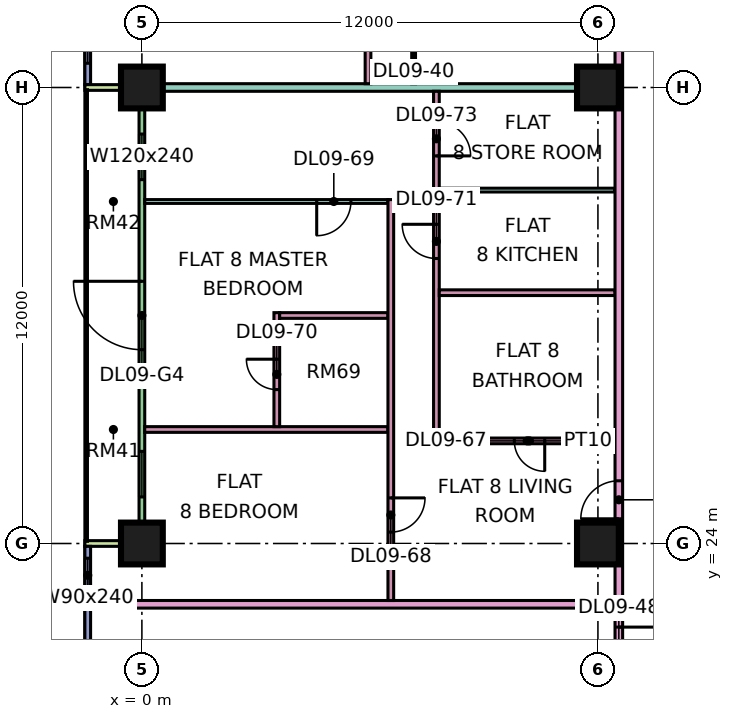
"""IFC4 building model, lengths in metres.
Left out: names, types, materials, properties, quantities, classifications, styles, units other than length and angle.
Written with IfcOpenShell. Run it as: python <this file> out.ifc"""

import sys

from ifc_helpers import new_model, si_unit, direction, frame, frame_2d, origin, origin_2d, place, context, subcontext, project, spatial, rectangle, extrude, element, fill, save


model = new_model("IFC4")
c1 = context("Model", 3, precision=1e-05, world=origin(), true_north=direction((0.0, 1.0)))
c2 = subcontext(c1, "Body", "Model", "MODEL_VIEW")
j1 = project(units=[si_unit("LENGTHUNIT", "METRE"), si_unit("PLANEANGLEUNIT", "RADIAN")], contexts=[c1])
p1 = place(None, origin())
s1 = spatial("IfcSite", under=j1, at=p1, CompositionType="ELEMENT")
p2 = place(p1, origin())
s2 = spatial("IfcBuilding", under=s1, at=p2, CompositionType="ELEMENT")
p3 = place(p2, frame((0.0, 0.0, 48.9)))
s3 = spatial("IfcBuildingStorey", under=s2, at=p3, CompositionType="ELEMENT", Elevation=48.9)
p4 = place(p3, frame((0.0, 24.0, 0.0), z_axis=(0.0, 0.0, 1.0), x_axis=(1.0, 0.0, 0.0)))
e1 = element("IfcColumn", 1, at=p4, inside=s3, PredefinedType="COLUMN", context=c2, shape_type="SweptSolid", body=[
    extrude(rectangle(XDim=1.1, YDim=1.1, at=origin_2d()), origin(), (0.0, 0.0, 1.0), 3.75),
])
p5 = place(p3, frame((0.0, 36.0, 0.0), z_axis=(0.0, 0.0, 1.0), x_axis=(1.0, 0.0, 0.0)))
e2 = element("IfcColumn", 2, at=p5, inside=s3, PredefinedType="COLUMN", context=c2, shape_type="SweptSolid", body=[
    extrude(rectangle(XDim=1.1, YDim=1.1, at=origin_2d()), origin(), (0.0, 0.0, 1.0), 3.75),
])
for number, where, z_axis, x_axis in (
    (3, (12.0, 24.0, 0.0), (0.0, 0.0, 1.0), (1.0, 0.0, 0.0)),
    (4, (12.0, 36.0, 0.0), (0.0, 0.0, 1.0), (1.0, 0.0, 0.0)),
):
    element("IfcColumn", number, at=place(p3, frame(where, z_axis=z_axis, x_axis=x_axis)), inside=s3, PredefinedType="COLUMN", context=c2, shape_type="SweptSolid", body=[
        extrude(rectangle(XDim=1.1, YDim=1.1, at=origin_2d()), origin(), (0.0, 0.0, 1.0), 3.75),
    ])
p6 = place(p3, frame((-1.425, 47.925, 0.0), z_axis=(0.0, 0.0, 1.0), x_axis=(0.0, -1.0, 0.0)))
e5 = element("IfcWall", 5, at=p6, inside=s3, PredefinedType="SOLIDWALL", context=c2, shape_type="SweptSolid", body=[
    extrude(rectangle(XDim=11.85, YDim=0.15, at=frame_2d((5.925, 0.0))), origin(), (0.0, 0.0, 1.0), 3.35),
])
p7 = place(p6, frame((0.562, 0.0, 0.45)))
e6 = element("IfcOpeningElement", 6, at=p7, cuts=e5, PredefinedType="OPENING", context=c2, shape_type="SweptSolid", body=[
    extrude(rectangle(XDim=1.8, YDim=2.4, at=frame_2d((0.9, 1.2))), frame((0.0, 0.085, 0.0), z_axis=(0.0, -1.0, 0.0), x_axis=(1.0, 0.0, 0.0)), (0.0, 0.0, 1.0), 0.17),
])
p8 = place(p6, frame((4.425, 0.0, 0.45)))
e7 = element("IfcOpeningElement", 7, at=p8, cuts=e5, PredefinedType="OPENING", context=c2, shape_type="SweptSolid", body=[
    extrude(rectangle(XDim=3.0, YDim=2.4, at=frame_2d((1.5, 1.2))), frame((0.0, 0.085, 0.0), z_axis=(0.0, -1.0, 0.0), x_axis=(1.0, 0.0, 0.0)), (0.0, 0.0, 1.0), 0.17),
])
p9 = place(p6, frame((9.488, 0.0, 0.45)))
e8 = element("IfcOpeningElement", 8, at=p9, cuts=e5, PredefinedType="OPENING", context=c2, shape_type="SweptSolid", body=[
    extrude(rectangle(XDim=1.8, YDim=2.4, at=frame_2d((0.9, 1.2))), frame((0.0, 0.085, 0.0), z_axis=(0.0, -1.0, 0.0), x_axis=(1.0, 0.0, 0.0)), (0.0, 0.0, 1.0), 0.17),
])
p10 = place(p3, frame((0.0, 35.925, 0.0), z_axis=(0.0, 0.0, 1.0), x_axis=(0.0, -1.0, 0.0)))
e9 = element("IfcWall", 9, at=p10, inside=s3, PredefinedType="SOLIDWALL", context=c2, shape_type="SweptSolid", body=[
    extrude(rectangle(XDim=11.85, YDim=0.15, at=frame_2d((5.925, 0.0))), origin(), (0.0, 0.0, 1.0), 3.35),
])
p11 = place(p10, frame((1.15, 0.0, 0.45)))
e10 = element("IfcOpeningElement", 10, at=p11, cuts=e9, PredefinedType="OPENING", context=c2, shape_type="SweptSolid", body=[
    extrude(rectangle(XDim=1.2, YDim=2.4, at=frame_2d((0.6, 1.2))), frame((0.0, 0.085, 0.0), z_axis=(0.0, -1.0, 0.0), x_axis=(1.0, 0.0, 0.0)), (0.0, 0.0, 1.0), 0.17),
])
p12 = place(p10, frame((5.025, 0.0, 0.0)))
e11 = element("IfcOpeningElement", 11, at=p12, cuts=e9, PredefinedType="OPENING", context=c2, shape_type="SweptSolid", body=[
    extrude(rectangle(XDim=1.8, YDim=2.4, at=frame_2d((0.9, 1.2))), frame((0.0, 0.085, 0.0), z_axis=(0.0, -1.0, 0.0), x_axis=(1.0, 0.0, 0.0)), (0.0, 0.0, 1.0), 0.17),
])
p13 = place(p10, frame((9.5, 0.0, 0.45)))
e12 = element("IfcOpeningElement", 12, at=p13, cuts=e9, PredefinedType="OPENING", context=c2, shape_type="SweptSolid", body=[
    extrude(rectangle(XDim=1.2, YDim=2.4, at=frame_2d((0.6, 1.2))), frame((0.0, 0.085, 0.0), z_axis=(0.0, -1.0, 0.0), x_axis=(1.0, 0.0, 0.0)), (0.0, 0.0, 1.0), 0.17),
])
for number, where, z_axis, x_axis in (
    (13, (-1.5, 36.0, 0.0), (0.0, 0.0, 1.0), (1.0, 0.0, 0.0)),
    (14, (-1.5, 24.0, 0.0), (0.0, 0.0, 1.0), (1.0, 0.0, 0.0)),
):
    element("IfcWall", number, at=place(p3, frame(where, z_axis=z_axis, x_axis=x_axis)), inside=s3, PredefinedType="SOLIDWALL", context=c2, shape_type="SweptSolid", body=[
        extrude(rectangle(XDim=1.5, YDim=0.15, at=frame_2d((0.75, 0.0))), origin(), (0.0, 0.0, 1.0), 3.35),
    ])
p14 = place(p3, frame((-1.425, 23.925, 0.0), z_axis=(0.0, 0.0, 1.0), x_axis=(0.0, -1.0, 0.0)))
e15 = element("IfcWall", 15, at=p14, inside=s3, PredefinedType="SOLIDWALL", context=c2, shape_type="SweptSolid", body=[
    extrude(rectangle(XDim=11.425, YDim=0.15, at=frame_2d((5.712, 0.0))), origin(), (0.0, 0.0, 1.0), 3.35),
])
p15 = place(p14, frame((0.312, 0.0, 0.45)))
e16 = element("IfcOpeningElement", 16, at=p15, cuts=e15, PredefinedType="OPENING", context=c2, shape_type="SweptSolid", body=[
    extrude(rectangle(XDim=0.9, YDim=2.4, at=frame_2d((0.45, 1.2))), frame((0.0, 0.085, 0.0), z_axis=(0.0, -1.0, 0.0), x_axis=(1.0, 0.0, 0.0)), (0.0, 0.0, 1.0), 0.17),
])
p16 = place(p14, frame((6.175, 0.0, 0.45)))
e17 = element("IfcOpeningElement", 17, at=p16, cuts=e15, PredefinedType="OPENING", context=c2, shape_type="SweptSolid", body=[
    extrude(rectangle(XDim=3.0, YDim=2.4, at=frame_2d((1.5, 1.2))), frame((0.0, 0.085, 0.0), z_axis=(0.0, -1.0, 0.0), x_axis=(1.0, 0.0, 0.0)), (0.0, 0.0, 1.0), 0.17),
])
p17 = place(p3, frame((-1.35, 22.4, 0.0), z_axis=(0.0, 0.0, 1.0), x_axis=(1.0, 0.0, 0.0)))
e18 = element("IfcWall", 18, at=p17, inside=s3, PredefinedType="PARTITIONING", context=c2, shape_type="SweptSolid", body=[
    extrude(rectangle(XDim=13.8, YDim=0.2, at=frame_2d((6.9, 0.0))), origin(), (0.0, 0.0, 1.0), 3.35),
])
e19 = element("IfcWall", 19, at=p5, inside=s3, PredefinedType="PARTITIONING", context=c2, shape_type="SweptSolid", body=[
    extrude(rectangle(XDim=12.45, YDim=0.2, at=frame_2d((6.225, 0.0))), origin(), (0.0, 0.0, 1.0), 3.35),
])
p18 = place(p3, frame((0.074, 27.0, 0.0), z_axis=(0.0, 0.0, 1.0), x_axis=(1.0, 0.0, 0.0)))
e20 = element("IfcWall", 20, at=p18, inside=s3, PredefinedType="PARTITIONING", context=c2, shape_type="SweptSolid", body=[
    extrude(rectangle(XDim=6.401, YDim=0.15, at=frame_2d((3.201, 0.0))), origin(), (0.0, 0.0, 1.0), 3.35),
])
p19 = place(p3, frame((0.074, 33.0, 0.0), z_axis=(0.0, 0.0, 1.0), x_axis=(1.0, 0.0, 0.0)))
e21 = element("IfcWall", 21, at=p19, inside=s3, PredefinedType="PARTITIONING", context=c2, shape_type="SweptSolid", body=[
    extrude(rectangle(XDim=6.401, YDim=0.1, at=frame_2d((3.201, 0.0))), origin(), (0.0, 0.0, 1.0), 3.35),
])
p20 = place(p19, frame((4.526, 0.0, 0.0)))
e22 = element("IfcOpeningElement", 22, at=p20, cuts=e21, PredefinedType="OPENING", context=c2, shape_type="SweptSolid", body=[
    extrude(rectangle(XDim=0.9, YDim=2.1, at=frame_2d((0.45, 1.05))), frame((0.0, 0.06, 0.0), z_axis=(0.0, -1.0, 0.0), x_axis=(1.0, 0.0, 0.0)), (0.0, 0.0, 1.0), 0.12),
])
p21 = place(p3, frame((3.55, 27.075, 0.0), z_axis=(0.0, 0.0, 1.0), x_axis=(0.0, 1.0, 0.0)))
e23 = element("IfcWall", 23, at=p21, inside=s3, PredefinedType="PARTITIONING", context=c2, shape_type="SweptSolid", body=[
    extrude(rectangle(XDim=3.0, YDim=0.15, at=frame_2d((1.5, 0.0))), origin(), (0.0, 0.0, 1.0), 3.35),
])
p22 = place(p21, frame((0.975, 0.0, 0.0)))
e24 = element("IfcOpeningElement", 24, at=p22, cuts=e23, PredefinedType="OPENING", context=c2, shape_type="SweptSolid", body=[
    extrude(rectangle(XDim=0.8, YDim=2.1, at=frame_2d((0.4, 1.05))), frame((0.0, 0.085, 0.0), z_axis=(0.0, -1.0, 0.0), x_axis=(1.0, 0.0, 0.0)), (0.0, 0.0, 1.0), 0.17),
])
p23 = place(p3, frame((3.625, 30.0, 0.0), z_axis=(0.0, 0.0, 1.0), x_axis=(1.0, 0.0, 0.0)))
e25 = element("IfcWall", 25, at=p23, inside=s3, PredefinedType="PARTITIONING", context=c2, shape_type="SweptSolid", body=[
    extrude(rectangle(XDim=2.85, YDim=0.15, at=frame_2d((1.425, 0.0))), origin(), (0.0, 0.0, 1.0), 3.35),
])
p24 = place(p3, frame((5.95, 36.1, 0.0), z_axis=(0.0, 0.0, 1.0), x_axis=(0.0, 1.0, 0.0)))
e26 = element("IfcWall", 26, at=p24, inside=s3, PredefinedType="PARTITIONING", context=c2, shape_type="SweptSolid", body=[
    extrude(rectangle(XDim=8.95, YDim=0.15, at=frame_2d((4.475, 0.0))), origin(), (0.0, 0.0, 1.0), 3.35),
])
p25 = place(p24, frame((0.95, 0.0, 0.0)))
e27 = element("IfcOpeningElement", 27, at=p25, cuts=e26, PredefinedType="OPENING", context=c2, shape_type="SweptSolid", body=[
    extrude(rectangle(XDim=0.9, YDim=2.1, at=frame_2d((0.45, 1.05))), frame((0.0, 0.085, 0.0), z_axis=(0.0, -1.0, 0.0), x_axis=(1.0, 0.0, 0.0)), (0.0, 0.0, 1.0), 0.17),
])
p26 = place(p24, frame((6.95, 0.0, 0.0)))
e28 = element("IfcOpeningElement", 28, at=p26, cuts=e26, PredefinedType="OPENING", context=c2, shape_type="SweptSolid", body=[
    extrude(rectangle(XDim=0.9, YDim=2.1, at=frame_2d((0.45, 1.05))), frame((0.0, 0.085, 0.0), z_axis=(0.0, -1.0, 0.0), x_axis=(1.0, 0.0, 0.0)), (0.0, 0.0, 1.0), 0.17),
])
p27 = place(p3, frame((6.55, 22.5, 0.0), z_axis=(0.0, 0.0, 1.0), x_axis=(0.0, 1.0, 0.0)))
e29 = element("IfcWall", 29, at=p27, inside=s3, PredefinedType="PARTITIONING", context=c2, shape_type="SweptSolid", body=[
    extrude(rectangle(XDim=10.55, YDim=0.15, at=frame_2d((5.275, 0.0))), origin(), (0.0, 0.0, 1.0), 3.35),
])
p28 = place(p27, frame((1.8, 0.0, 0.0)))
e30 = element("IfcOpeningElement", 30, at=p28, cuts=e29, PredefinedType="OPENING", context=c2, shape_type="SweptSolid", body=[
    extrude(rectangle(XDim=0.9, YDim=2.1, at=frame_2d((0.45, 1.05))), frame((0.0, 0.085, 0.0), z_axis=(0.0, -1.0, 0.0), x_axis=(1.0, 0.0, 0.0)), (0.0, 0.0, 1.0), 0.17),
])
p29 = place(p3, frame((7.15, 36.1, 0.0), z_axis=(0.0, 0.0, 1.0), x_axis=(0.0, 1.0, 0.0)))
e31 = element("IfcWall", 31, at=p29, inside=s3, PredefinedType="PARTITIONING", context=c2, shape_type="SweptSolid", body=[
    extrude(rectangle(XDim=2.9, YDim=0.1, at=frame_2d((1.45, 0.0))), origin(), (0.0, 0.0, 1.0), 3.35),
])
p30 = place(p29, frame((0.95, 0.0, 0.0)))
e32 = element("IfcOpeningElement", 32, at=p30, cuts=e31, PredefinedType="OPENING", context=c2, shape_type="SweptSolid", body=[
    extrude(rectangle(XDim=0.9, YDim=2.1, at=frame_2d((0.45, 1.05))), frame((0.0, 0.06, 0.0), z_axis=(0.0, -1.0, 0.0), x_axis=(1.0, 0.0, 0.0)), (0.0, 0.0, 1.0), 0.12),
])
p31 = place(p3, frame((7.75, 26.625, 0.0), z_axis=(0.0, 0.0, 1.0), x_axis=(0.0, 1.0, 0.0)))
e33 = element("IfcWall", 33, at=p31, inside=s3, PredefinedType="PARTITIONING", context=c2, shape_type="SweptSolid", body=[
    extrude(rectangle(XDim=9.275, YDim=0.15, at=frame_2d((4.637, 0.0))), origin(), (0.0, 0.0, 1.0), 3.35),
])
p32 = place(p31, frame((4.875, 0.0, 0.0)))
e34 = element("IfcOpeningElement", 34, at=p32, cuts=e33, PredefinedType="OPENING", context=c2, shape_type="SweptSolid", body=[
    extrude(rectangle(XDim=0.9, YDim=2.1, at=frame_2d((0.45, 1.05))), frame((0.0, 0.085, 0.0), z_axis=(0.0, -1.0, 0.0), x_axis=(1.0, 0.0, 0.0)), (0.0, 0.0, 1.0), 0.17),
])
p33 = place(p31, frame((7.575, 0.0, 0.0)))
e35 = element("IfcOpeningElement", 35, at=p33, cuts=e33, PredefinedType="OPENING", context=c2, shape_type="SweptSolid", body=[
    extrude(rectangle(XDim=0.9, YDim=2.1, at=frame_2d((0.45, 1.05))), frame((0.0, 0.085, 0.0), z_axis=(0.0, -1.0, 0.0), x_axis=(1.0, 0.0, 0.0)), (0.0, 0.0, 1.0), 0.17),
])
p34 = place(p3, frame((7.825, 26.7, 0.0), z_axis=(0.0, 0.0, 1.0), x_axis=(1.0, 0.0, 0.0)))
e36 = element("IfcWall", 36, at=p34, inside=s3, PredefinedType="PARTITIONING", context=c2, shape_type="SweptSolid", body=[
    extrude(rectangle(XDim=4.625, YDim=0.15, at=frame_2d((2.312, 0.0))), origin(), (0.0, 0.0, 1.0), 3.35),
])
p35 = place(p34, frame((1.975, 0.0, 0.0)))
e37 = element("IfcOpeningElement", 37, at=p35, cuts=e36, PredefinedType="OPENING", context=c2, shape_type="SweptSolid", body=[
    extrude(rectangle(XDim=0.8, YDim=2.1, at=frame_2d((0.4, 1.05))), frame((0.0, 0.085, 0.0), z_axis=(0.0, -1.0, 0.0), x_axis=(1.0, 0.0, 0.0)), (0.0, 0.0, 1.0), 0.17),
])
p36 = place(p3, frame((7.825, 30.6, 0.0), z_axis=(0.0, 0.0, 1.0), x_axis=(1.0, 0.0, 0.0)))
e38 = element("IfcWall", 38, at=p36, inside=s3, PredefinedType="PARTITIONING", context=c2, shape_type="SweptSolid", body=[
    extrude(rectangle(XDim=4.625, YDim=0.15, at=frame_2d((2.312, 0.0))), origin(), (0.0, 0.0, 1.0), 3.35),
])
p37 = place(p3, frame((7.825, 33.3, 0.0), z_axis=(0.0, 0.0, 1.0), x_axis=(1.0, 0.0, 0.0)))
e39 = element("IfcWall", 39, at=p37, inside=s3, PredefinedType="PARTITIONING", context=c2, shape_type="SweptSolid", body=[
    extrude(rectangle(XDim=4.625, YDim=0.1, at=frame_2d((2.312, 0.0))), origin(), (0.0, 0.0, 1.0), 3.35),
])
p38 = place(p3, frame((12.55, 20.0, 0.0), z_axis=(0.0, 0.0, 1.0), x_axis=(0.0, 1.0, 0.0)))
e40 = element("IfcWall", 40, at=p38, inside=s3, PredefinedType="PARTITIONING", context=c2, shape_type="SweptSolid", body=[
    extrude(rectangle(XDim=19.0, YDim=0.2, at=frame_2d((9.5, 0.0))), origin(), (0.0, 0.0, 1.0), 3.35),
])
p39 = place(p38, frame((0.6, 0.0, 0.0)))
e41 = element("IfcOpeningElement", 41, at=p39, cuts=e40, PredefinedType="OPENING", context=c2, shape_type="SweptSolid", body=[
    extrude(rectangle(XDim=1.2, YDim=2.1, at=frame_2d((0.6, 1.05))), frame((0.0, 0.11, 0.0), z_axis=(0.0, -1.0, 0.0), x_axis=(1.0, 0.0, 0.0)), (0.0, 0.0, 1.0), 0.22),
])
p40 = place(p38, frame((4.65, 0.0, 0.0)))
e42 = element("IfcOpeningElement", 42, at=p40, cuts=e40, PredefinedType="OPENING", context=c2, shape_type="SweptSolid", body=[
    extrude(rectangle(XDim=1.0, YDim=2.1, at=frame_2d((0.5, 1.05))), frame((0.0, 0.11, 0.0), z_axis=(0.0, -1.0, 0.0), x_axis=(1.0, 0.0, 0.0)), (0.0, 0.0, 1.0), 0.22),
])
p41 = place(p9, origin())
e43 = element("IfcWindow", 43, at=p41, inside=s3, PartitioningType="SINGLE_PANEL", PredefinedType="WINDOW", context=c2, shape_type="SweptSolid", body=[
    extrude(rectangle(XDim=1.8, YDim=2.4, at=frame_2d((0.9, 1.2))), frame((0.0, 0.03, 0.0), z_axis=(0.0, -1.0, 0.0), x_axis=(1.0, 0.0, 0.0)), (0.0, 0.0, 1.0), 0.06),
])
fill(e8, e43)
p42 = place(p11, origin())
e44 = element("IfcWindow", 44, at=p42, inside=s3, PartitioningType="SINGLE_PANEL", PredefinedType="WINDOW", context=c2, shape_type="SweptSolid", body=[
    extrude(rectangle(XDim=1.2, YDim=2.4, at=frame_2d((0.6, 1.2))), frame((0.0, 0.03, 0.0), z_axis=(0.0, -1.0, 0.0), x_axis=(1.0, 0.0, 0.0)), (0.0, 0.0, 1.0), 0.06),
])
fill(e10, e44)
p43 = place(p12, frame((1.8, 0.0, 0.0), z_axis=(0.0, 0.0, 1.0), x_axis=(-1.0, 0.0, 0.0)))
e45 = element("IfcDoor", 45, at=p43, inside=s3, OperationType="DOUBLE_DOOR_SINGLE_SWING", PredefinedType="DOOR", context=c2, shape_type="SweptSolid", body=[
    extrude(rectangle(XDim=1.8, YDim=2.4, at=frame_2d((0.9, 1.2))), frame((0.0, 0.025, 0.0), z_axis=(0.0, -1.0, 0.0), x_axis=(1.0, 0.0, 0.0)), (0.0, 0.0, 1.0), 0.05),
])
fill(e11, e45)
p44 = place(p13, origin())
e46 = element("IfcWindow", 46, at=p44, inside=s3, PartitioningType="SINGLE_PANEL", PredefinedType="WINDOW", context=c2, shape_type="SweptSolid", body=[
    extrude(rectangle(XDim=1.2, YDim=2.4, at=frame_2d((0.6, 1.2))), frame((0.0, 0.03, 0.0), z_axis=(0.0, -1.0, 0.0), x_axis=(1.0, 0.0, 0.0)), (0.0, 0.0, 1.0), 0.06),
])
fill(e12, e46)
p45 = place(p15, origin())
e47 = element("IfcWindow", 47, at=p45, inside=s3, PartitioningType="SINGLE_PANEL", PredefinedType="WINDOW", context=c2, shape_type="SweptSolid", body=[
    extrude(rectangle(XDim=0.9, YDim=2.4, at=frame_2d((0.45, 1.2))), frame((0.0, 0.03, 0.0), z_axis=(0.0, -1.0, 0.0), x_axis=(1.0, 0.0, 0.0)), (0.0, 0.0, 1.0), 0.06),
])
fill(e16, e47)
p46 = place(p39, origin())
e48 = element("IfcDoor", 48, at=p46, inside=s3, OperationType="SINGLE_SWING_RIGHT", PredefinedType="DOOR", context=c2, shape_type="SweptSolid", body=[
    extrude(rectangle(XDim=1.2, YDim=2.1, at=frame_2d((0.6, 1.05))), frame((0.0, 0.025, 0.0), z_axis=(0.0, -1.0, 0.0), x_axis=(1.0, 0.0, 0.0)), (0.0, 0.0, 1.0), 0.05),
])
fill(e41, e48)
p47 = place(p35, origin())
e49 = element("IfcDoor", 49, at=p47, inside=s3, OperationType="SINGLE_SWING_RIGHT", PredefinedType="DOOR", context=c2, shape_type="SweptSolid", body=[
    extrude(rectangle(XDim=0.8, YDim=2.1, at=frame_2d((0.4, 1.05))), frame((0.0, 0.025, 0.0), z_axis=(0.0, -1.0, 0.0), x_axis=(1.0, 0.0, 0.0)), (0.0, 0.0, 1.0), 0.05),
])
fill(e37, e49)
p48 = place(p28, origin())
e50 = element("IfcDoor", 50, at=p48, inside=s3, OperationType="SINGLE_SWING_RIGHT", PredefinedType="DOOR", context=c2, shape_type="SweptSolid", body=[
    extrude(rectangle(XDim=0.9, YDim=2.1, at=frame_2d((0.45, 1.05))), frame((0.0, 0.025, 0.0), z_axis=(0.0, -1.0, 0.0), x_axis=(1.0, 0.0, 0.0)), (0.0, 0.0, 1.0), 0.05),
])
fill(e30, e50)
p49 = place(p20, frame((0.9, 0.0, 0.0), z_axis=(0.0, 0.0, 1.0), x_axis=(-1.0, 0.0, 0.0)))
e51 = element("IfcDoor", 51, at=p49, inside=s3, OperationType="SINGLE_SWING_LEFT", PredefinedType="DOOR", context=c2, shape_type="SweptSolid", body=[
    extrude(rectangle(XDim=0.9, YDim=2.1, at=frame_2d((0.45, 1.05))), frame((0.0, 0.025, 0.0), z_axis=(0.0, -1.0, 0.0), x_axis=(1.0, 0.0, 0.0)), (0.0, 0.0, 1.0), 0.05),
])
fill(e22, e51)
p50 = place(p22, frame((0.8, 0.0, 0.0), z_axis=(0.0, 0.0, 1.0), x_axis=(-1.0, 0.0, 0.0)))
e52 = element("IfcDoor", 52, at=p50, inside=s3, OperationType="SINGLE_SWING_RIGHT", PredefinedType="DOOR", context=c2, shape_type="SweptSolid", body=[
    extrude(rectangle(XDim=0.8, YDim=2.1, at=frame_2d((0.4, 1.05))), frame((0.0, 0.025, 0.0), z_axis=(0.0, -1.0, 0.0), x_axis=(1.0, 0.0, 0.0)), (0.0, 0.0, 1.0), 0.05),
])
fill(e24, e52)
p51 = place(p32, frame((0.9, 0.0, 0.0), z_axis=(0.0, 0.0, 1.0), x_axis=(-1.0, 0.0, 0.0)))
e53 = element("IfcDoor", 53, at=p51, inside=s3, OperationType="SINGLE_SWING_RIGHT", PredefinedType="DOOR", context=c2, shape_type="SweptSolid", body=[
    extrude(rectangle(XDim=0.9, YDim=2.1, at=frame_2d((0.45, 1.05))), frame((0.0, 0.025, 0.0), z_axis=(0.0, -1.0, 0.0), x_axis=(1.0, 0.0, 0.0)), (0.0, 0.0, 1.0), 0.05),
])
fill(e34, e53)
p52 = place(p40, origin())
e54 = element("IfcDoor", 54, at=p52, inside=s3, OperationType="SINGLE_SWING_LEFT", PredefinedType="DOOR", context=c2, shape_type="SweptSolid", body=[
    extrude(rectangle(XDim=1.0, YDim=2.1, at=frame_2d((0.5, 1.05))), frame((0.0, 0.025, 0.0), z_axis=(0.0, -1.0, 0.0), x_axis=(1.0, 0.0, 0.0)), (0.0, 0.0, 1.0), 0.05),
])
fill(e42, e54)
p53 = place(p33, frame((0.9, 0.0, 0.0), z_axis=(0.0, 0.0, 1.0), x_axis=(-1.0, 0.0, 0.0)))
e55 = element("IfcDoor", 55, at=p53, inside=s3, OperationType="SINGLE_SWING_LEFT", PredefinedType="DOOR", context=c2, shape_type="SweptSolid", body=[
    extrude(rectangle(XDim=0.9, YDim=2.1, at=frame_2d((0.45, 1.05))), frame((0.0, 0.025, 0.0), z_axis=(0.0, -1.0, 0.0), x_axis=(1.0, 0.0, 0.0)), (0.0, 0.0, 1.0), 0.05),
])
fill(e35, e55)
save(model, sys.argv[1])
